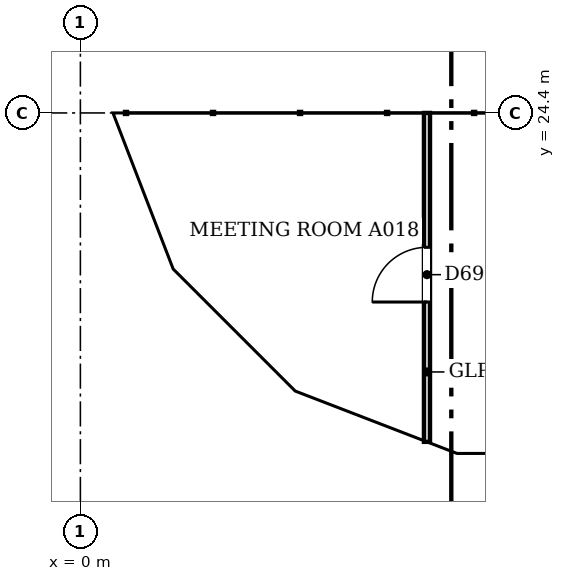
"""IFC4 building model, lengths in metres.
Left out: names, types, materials, properties, quantities, classifications, styles, units other than length and angle.
Written with IfcOpenShell. Run it as: python <this file> out.ifc"""

import sys

from ifc_helpers import new_model, si_unit, direction, frame, frame_2d, origin, place, context, subcontext, project, spatial, polyline, rectangle, outline, extrude, faceted_brep, source, transform, mapped, element, fill, save


model = new_model("IFC4")
c1 = context("Model", 3, precision=1e-05, world=origin(), true_north=direction((0.0, 1.0)))
c2 = subcontext(c1, "Body", "Model", "MODEL_VIEW")
j1 = project(units=[si_unit("LENGTHUNIT", "METRE"), si_unit("PLANEANGLEUNIT", "RADIAN")], contexts=[c1])
p1 = place(None, origin())
s1 = spatial("IfcSite", under=j1, at=p1, CompositionType="ELEMENT")
p2 = place(p1, origin())
s2 = spatial("IfcBuilding", under=s1, at=p2, CompositionType="ELEMENT")
p3 = place(p2, frame((0.0, 0.0, 60.0)))
s3 = spatial("IfcBuildingStorey", under=s2, at=p3, CompositionType="ELEMENT", Elevation=60.0)
m1 = source(origin(), c2, "Body", "Brep", [
    faceted_brep([(3.003, -0.25, 0.0), (3.05, -0.25, 0.06), (3.05, -0.25, 7.54), (3.003, -0.25, 7.6), (0.0, -0.25, 3.8), (0.0, 0.25, 3.8), (2.957, 0.25, 7.541), (2.957, 0.25, 0.059), (3.003, 0.0, 0.0), (3.003, 0.0, 7.6)], [[[0, 1, 2, 3, 4]], [[5, 6, 7]], [[1, 0, 8]], [[9, 3, 2]], [[6, 5, 4, 3, 9]], [[5, 7, 8, 0, 4]], [[1, 8, 7, 6, 9, 2]]]),
])
p4 = place(p3, frame((0.25, 27.45, -3.8), z_axis=(0.0, 0.0, 1.0), x_axis=(0.0, -1.0, 0.0)))
e1 = element("IfcWall", 1, at=p4, inside=s3, PredefinedType="SOLIDWALL", context=c2, shape_type="MappedRepresentation", body=[
    mapped(m1, transform((0.0, 0.0, 0.0), scale=1.0)),
])
m2 = source(origin(), c2, "Body", "SweptSolid", [
    extrude(outline(polyline([(2.803, 6.944), (0.319, 3.8), (2.803, 0.656), (2.803, 6.944)])), frame((0.0, 0.26, 0.0), z_axis=(0.0, -1.0, 0.0), x_axis=(1.0, 0.0, 0.0)), (0.0, 0.0, 1.0), 0.52),
])
p5 = place(p4, origin())
e2 = element("IfcOpeningElement", 2, at=p5, cuts=e1, PredefinedType="OPENING", context=c2, shape_type="MappedRepresentation", body=[
    mapped(m2, transform((0.0, 0.0, 0.0), scale=1.0)),
])
m3 = source(origin(), c2, "Body", "Brep", [
    faceted_brep([(0.047, -0.25, 0.0), (2.997, -0.25, 3.8), (0.047, -0.25, 7.6), (0.0, -0.25, 7.541), (0.0, -0.25, 0.059), (0.093, 0.25, 7.54), (2.944, 0.25, 3.868), (2.944, 0.25, 3.732), (0.093, 0.25, 0.06), (2.997, 0.0, 3.8), (0.047, 0.0, 0.0), (0.047, 0.0, 7.6)], [[[0, 1, 2, 3, 4]], [[5, 6, 7, 8]], [[8, 7, 9, 1, 0, 10]], [[6, 5, 11, 2, 1, 9]], [[3, 2, 11]], [[10, 0, 4]], [[8, 10, 4, 3, 11, 5]], [[9, 7, 6]]]),
])
p6 = place(p3, frame((0.233, 24.49, -3.8), z_axis=(0.0, 0.0, 1.0), x_axis=(0.359901446078, -0.932990326376, 0.0)))
e3 = element("IfcWall", 3, at=p6, inside=s3, PredefinedType="SOLIDWALL", context=c2, shape_type="MappedRepresentation", body=[
    mapped(m3, transform((0.0, 0.0, 0.0), scale=1.0)),
])
m4 = source(origin(), c2, "Body", "SweptSolid", [
    extrude(outline(polyline([(0.247, 0.665), (2.681, 3.8), (0.247, 6.935), (0.247, 0.665)])), frame((0.0, 0.26, 0.0), z_axis=(0.0, -1.0, 0.0), x_axis=(1.0, 0.0, 0.0)), (0.0, 0.0, 1.0), 0.52),
])
p7 = place(p6, origin())
e4 = element("IfcOpeningElement", 4, at=p7, cuts=e3, PredefinedType="OPENING", context=c2, shape_type="MappedRepresentation", body=[
    mapped(m4, transform((0.0, 0.0, 0.0), scale=1.0)),
])
m5 = source(origin(), c2, "Body", "Brep", [
    faceted_brep([(2.944, -0.25, 0.0), (2.997, -0.25, 0.068), (2.997, -0.25, 7.532), (2.944, -0.25, 7.6), (0.0, -0.25, 3.8), (0.053, 0.25, 3.868), (2.891, 0.25, 7.532), (2.891, 0.25, 0.068), (0.053, 0.25, 3.732), (2.944, 0.0, 0.0), (2.944, 0.0, 7.6), (0.0, 0.0, 3.8)], [[[0, 1, 2, 3, 4]], [[5, 6, 7, 8]], [[1, 0, 9]], [[10, 3, 2]], [[6, 5, 11, 4, 3, 10]], [[8, 7, 9, 0, 4, 11]], [[8, 11, 5]], [[1, 9, 7, 6, 10, 2]]]),
])
p8 = place(p3, frame((1.312, 21.694, -3.8), z_axis=(0.0, 0.0, 1.0), x_axis=(0.707066050402, -0.707147509625, 0.0)))
e5 = element("IfcWall", 5, at=p8, inside=s3, PredefinedType="SOLIDWALL", context=c2, shape_type="MappedRepresentation", body=[
    mapped(m5, transform((0.0, 0.0, 0.0), scale=1.0)),
])
m6 = source(origin(), c2, "Body", "SweptSolid", [
    extrude(outline(polyline([(2.744, 6.934), (0.316, 3.8), (2.744, 0.666), (2.744, 6.934)])), frame((0.0, 0.26, 0.0), z_axis=(0.0, -1.0, 0.0), x_axis=(1.0, 0.0, 0.0)), (0.0, 0.0, 1.0), 0.52),
])
p9 = place(p8, origin())
e6 = element("IfcOpeningElement", 6, at=p9, cuts=e5, PredefinedType="OPENING", context=c2, shape_type="MappedRepresentation", body=[
    mapped(m6, transform((0.0, 0.0, 0.0), scale=1.0)),
])
m7 = source(origin(), c2, "Body", "Brep", [
    faceted_brep([(0.053, -0.25, 0.0), (3.003, -0.25, 3.8), (0.053, -0.25, 7.6), (0.0, -0.25, 7.532), (0.0, -0.25, 0.068), (0.106, 0.25, 7.532), (2.957, 0.25, 3.86), (2.957, 0.25, 3.74), (0.106, 0.25, 0.068), (3.003, 0.0, 3.8), (0.053, 0.0, 0.0), (0.053, 0.0, 7.6)], [[[0, 1, 2, 3, 4]], [[5, 6, 7, 8]], [[8, 7, 9, 1, 0, 10]], [[6, 5, 11, 2, 1, 9]], [[3, 2, 11]], [[10, 0, 4]], [[8, 10, 4, 3, 11, 5]], [[9, 7, 6]]]),
])
p10 = place(p3, frame((3.344, 19.631, -3.8), z_axis=(0.0, 0.0, 1.0), x_axis=(0.933007896601, -0.359855894603, 0.0)))
e7 = element("IfcWall", 7, at=p10, inside=s3, PredefinedType="SOLIDWALL", context=c2, shape_type="MappedRepresentation", body=[
    mapped(m7, transform((0.0, 0.0, 0.0), scale=1.0)),
])
m8 = source(origin(), c2, "Body", "SweptSolid", [
    extrude(outline(polyline([(0.253, 0.665), (2.687, 3.8), (0.253, 6.935), (0.253, 0.665)])), frame((0.0, 0.26, 0.0), z_axis=(0.0, -1.0, 0.0), x_axis=(1.0, 0.0, 0.0)), (0.0, 0.0, 1.0), 0.52),
])
p11 = place(p10, origin())
e8 = element("IfcOpeningElement", 8, at=p11, cuts=e7, PredefinedType="OPENING", context=c2, shape_type="MappedRepresentation", body=[
    mapped(m8, transform((0.0, 0.0, 0.0), scale=1.0)),
])
m9 = source(origin(), c2, "Body", "Brep", [
    faceted_brep([(3.003, -0.25, 0.0), (6.053, -0.25, 3.8), (3.003, -0.25, 7.6), (0.0, -0.25, 3.8), (0.047, 0.25, 3.859), (3.003, 0.25, 7.6), (6.053, 0.25, 3.8), (3.003, 0.25, 0.0), (0.047, 0.25, 3.741), (0.0, 0.0, 3.8)], [[[0, 1, 2, 3]], [[4, 5, 6, 7, 8]], [[7, 6, 1, 0]], [[6, 5, 2, 1]], [[5, 4, 9, 3, 2]], [[8, 7, 0, 3, 9]], [[8, 9, 4]]]),
])
p12 = place(p3, frame((6.146, 18.55, -3.8), z_axis=(0.0, 0.0, 1.0), x_axis=(1.0, 0.0, 0.0)))
e9 = element("IfcWall", 9, at=p12, inside=s3, PredefinedType="SOLIDWALL", context=c2, shape_type="MappedRepresentation", body=[
    mapped(m9, transform((0.0, 0.0, 0.0), scale=1.0)),
])
m10 = source(origin(), c2, "Body", "SweptSolid", [
    extrude(outline(polyline([(3.005, 0.401), (5.733, 3.8), (3.005, 7.199), (0.319, 3.8), (3.005, 0.401)])), frame((0.0, 0.26, 0.0), z_axis=(0.0, -1.0, 0.0), x_axis=(1.0, 0.0, 0.0)), (0.0, 0.0, 1.0), 0.52),
])
p13 = place(p12, origin())
e10 = element("IfcOpeningElement", 10, at=p13, cuts=e9, PredefinedType="OPENING", context=c2, shape_type="MappedRepresentation", body=[
    mapped(m10, transform((0.0, 0.0, 0.0), scale=1.0)),
])
m11 = source(origin(), c2, "Body", "Brep", [
    faceted_brep([(3.05, -0.25, 0.0), (6.053, -0.25, 3.8), (0.0, -0.25, 3.8), (0.0, 0.25, 3.8), (6.007, 0.25, 3.8), (6.007, 0.25, 3.741), (3.05, 0.25, 0.0), (6.053, 0.0, 3.8)], [[[0, 1, 2]], [[3, 4, 5, 6]], [[6, 5, 7, 1, 0]], [[4, 3, 2, 1, 7]], [[3, 6, 0, 2]], [[5, 4, 7]]]),
])
p14 = place(p3, frame((0.25, 30.5, 0.0), z_axis=(0.0, 0.0, 1.0), x_axis=(0.0, -1.0, 0.0)))
e11 = element("IfcWall", 11, at=p14, inside=s3, PredefinedType="SOLIDWALL", context=c2, shape_type="MappedRepresentation", body=[
    mapped(m11, transform((0.0, 0.0, 0.0), scale=1.0)),
])
m12 = source(origin(), c2, "Body", "SweptSolid", [
    extrude(outline(polyline([(3.049, 0.401), (5.537, 3.55), (0.521, 3.55), (3.049, 0.401)])), frame((0.0, 0.26, 0.0), z_axis=(0.0, -1.0, 0.0), x_axis=(1.0, 0.0, 0.0)), (0.0, 0.0, 1.0), 0.52),
])
p15 = place(p14, origin())
e12 = element("IfcOpeningElement", 12, at=p15, cuts=e11, PredefinedType="OPENING", context=c2, shape_type="MappedRepresentation", body=[
    mapped(m12, transform((0.0, 0.0, 0.0), scale=1.0)),
])
m13 = source(origin(), c2, "Body", "Brep", [
    faceted_brep([(2.95, -0.25, 0.0), (3.003, -0.25, 0.068), (3.003, -0.25, 3.8), (0.0, -0.25, 3.8), (0.047, 0.25, 3.8), (2.898, 0.25, 3.8), (2.898, 0.25, 0.068), (0.047, 0.25, 3.74), (2.95, 0.0, 0.0), (0.0, 0.0, 3.8)], [[[0, 1, 2, 3]], [[4, 5, 6, 7]], [[1, 0, 8]], [[5, 4, 9, 3, 2]], [[7, 6, 8, 0, 3, 9]], [[7, 9, 4]], [[1, 8, 6, 5, 2]]]),
])
p16 = place(p3, frame((0.25, 24.447, 0.0), z_axis=(0.0, 0.0, 1.0), x_axis=(0.35992665181, -0.932980602862, 0.0)))
e13 = element("IfcWall", 13, at=p16, inside=s3, PredefinedType="SOLIDWALL", context=c2, shape_type="MappedRepresentation", body=[
    mapped(m13, transform((0.0, 0.0, 0.0), scale=1.0)),
])
m14 = source(origin(), c2, "Body", "SweptSolid", [
    extrude(outline(polyline([(2.75, 3.55), (0.511, 3.55), (2.75, 0.665), (2.75, 3.55)])), frame((0.0, 0.26, 0.0), z_axis=(0.0, -1.0, 0.0), x_axis=(1.0, 0.0, 0.0)), (0.0, 0.0, 1.0), 0.52),
])
p17 = place(p16, origin())
e14 = element("IfcOpeningElement", 14, at=p17, cuts=e13, PredefinedType="OPENING", context=c2, shape_type="MappedRepresentation", body=[
    mapped(m14, transform((0.0, 0.0, 0.0), scale=1.0)),
])
m15 = source(origin(), c2, "Body", "Brep", [
    faceted_brep([(0.053, -0.25, 0.0), (2.997, -0.25, 3.8), (0.0, -0.25, 3.8), (0.0, -0.25, 0.068), (0.106, 0.25, 3.8), (2.944, 0.25, 3.8), (2.944, 0.25, 3.732), (0.106, 0.25, 0.068), (2.997, 0.0, 3.8), (0.053, 0.0, 0.0)], [[[0, 1, 2, 3]], [[4, 5, 6, 7]], [[7, 6, 8, 1, 0, 9]], [[5, 4, 2, 1, 8]], [[9, 0, 3]], [[7, 9, 3, 2, 4]], [[6, 5, 8]]]),
])
p18 = place(p3, frame((1.274, 21.731, 0.0), z_axis=(0.0, 0.0, 1.0), x_axis=(0.707147509625, -0.707066050402, 0.0)))
e15 = element("IfcWall", 15, at=p18, inside=s3, PredefinedType="SOLIDWALL", context=c2, shape_type="MappedRepresentation", body=[
    mapped(m15, transform((0.0, 0.0, 0.0), scale=1.0)),
])
m16 = source(origin(), c2, "Body", "SweptSolid", [
    extrude(outline(polyline([(0.253, 0.666), (2.487, 3.55), (0.253, 3.55), (0.253, 0.666)])), frame((0.0, 0.26, 0.0), z_axis=(0.0, -1.0, 0.0), x_axis=(1.0, 0.0, 0.0)), (0.0, 0.0, 1.0), 0.52),
])
p19 = place(p18, origin())
e16 = element("IfcOpeningElement", 16, at=p19, cuts=e15, PredefinedType="OPENING", context=c2, shape_type="MappedRepresentation", body=[
    mapped(m16, transform((0.0, 0.0, 0.0), scale=1.0)),
])
m17 = source(origin(), c2, "Body", "Brep", [
    faceted_brep([(2.95, -0.25, 0.0), (2.997, -0.25, 0.059), (2.997, -0.25, 3.8), (0.0, -0.25, 3.8), (0.053, 0.25, 3.8), (2.904, 0.25, 3.8), (2.904, 0.25, 0.06), (0.053, 0.25, 3.732), (2.95, 0.0, 0.0), (0.0, 0.0, 3.8)], [[[0, 1, 2, 3]], [[4, 5, 6, 7]], [[1, 0, 8]], [[5, 4, 9, 3, 2]], [[7, 6, 8, 0, 3, 9]], [[7, 9, 4]], [[1, 8, 6, 5, 2]]]),
])
p20 = place(p3, frame((3.394, 19.612, 0.0), z_axis=(0.0, 0.0, 1.0), x_axis=(0.932990326376, -0.359901446078, 0.0)))
e17 = element("IfcWall", 17, at=p20, inside=s3, PredefinedType="SOLIDWALL", context=c2, shape_type="MappedRepresentation", body=[
    mapped(m17, transform((0.0, 0.0, 0.0), scale=1.0)),
])
p21 = place(p20, origin())
e18 = element("IfcOpeningElement", 18, at=p21, cuts=e17, PredefinedType="OPENING", context=c2, shape_type="MappedRepresentation", body=[
    mapped(m14, transform((0.0, 0.0, 0.0), scale=1.0)),
])
m18 = source(origin(), c2, "Body", "Brep", [
    faceted_brep([(0.047, -0.25, 0.0), (3.05, -0.25, 3.8), (0.0, -0.25, 3.8), (0.0, -0.25, 0.06), (0.093, 0.25, 3.8), (3.05, 0.25, 3.8), (0.093, 0.25, 0.059), (0.047, 0.0, 0.0)], [[[0, 1, 2, 3]], [[4, 5, 6]], [[6, 5, 1, 0, 7]], [[5, 4, 2, 1]], [[7, 0, 3]], [[6, 7, 3, 2, 4]]]),
])
p22 = place(p3, frame((6.1, 18.55, 0.0), z_axis=(0.0, 0.0, 1.0), x_axis=(1.0, 0.0, 0.0)))
e19 = element("IfcWall", 19, at=p22, inside=s3, PredefinedType="SOLIDWALL", context=c2, shape_type="MappedRepresentation", body=[
    mapped(m18, transform((0.0, 0.0, 0.0), scale=1.0)),
])
m19 = source(origin(), c2, "Body", "SweptSolid", [
    extrude(outline(polyline([(0.247, 0.656), (2.534, 3.55), (0.247, 3.55), (0.247, 0.656)])), frame((0.0, 0.26, 0.0), z_axis=(0.0, -1.0, 0.0), x_axis=(1.0, 0.0, 0.0)), (0.0, 0.0, 1.0), 0.52),
])
p23 = place(p22, origin())
e20 = element("IfcOpeningElement", 20, at=p23, cuts=e19, PredefinedType="OPENING", context=c2, shape_type="MappedRepresentation", body=[
    mapped(m19, transform((0.0, 0.0, 0.0), scale=1.0)),
])
p24 = place(p3, frame((5.7, 18.99, 0.0), z_axis=(0.0, 0.0, 1.0), x_axis=(0.0, 1.0, 0.0)))
e21 = element("IfcWall", 21, at=p24, inside=s3, PredefinedType="PARTITIONING", context=c2, shape_type="SweptSolid", body=[
    extrude(rectangle(XDim=5.41, YDim=0.1, at=frame_2d((2.705, 0.0))), origin(), (0.0, 0.0, 1.0), 2.888),
])
m20 = source(origin(), c2, "Body", "SweptSolid", [
    extrude(rectangle(XDim=0.9, YDim=2.1, at=frame_2d((0.45, 1.05))), frame((0.0, 0.06, 0.0), z_axis=(0.0, -1.0, 0.0), x_axis=(1.0, 0.0, 0.0)), (0.0, 0.0, 1.0), 0.12),
])
p25 = place(p24, frame((2.3, 0.0, 0.0)))
e22 = element("IfcOpeningElement", 22, at=p25, cuts=e21, PredefinedType="OPENING", context=c2, shape_type="MappedRepresentation", body=[
    mapped(m20, transform((0.0, 0.0, 0.0), scale=1.0)),
])
m21 = source(origin(), c2, "Body", "SweptSolid", [
    extrude(rectangle(XDim=0.9, YDim=2.1, at=frame_2d((0.45, 1.05))), frame((0.0, 0.025, 0.0), z_axis=(0.0, -1.0, 0.0), x_axis=(1.0, 0.0, 0.0)), (0.0, 0.0, 1.0), 0.05),
])
p26 = place(p25, origin())
e23 = element("IfcDoor", 23, at=p26, inside=s3, OperationType="SINGLE_SWING_LEFT", PredefinedType="DOOR", context=c2, shape_type="MappedRepresentation", body=[
    mapped(m21, transform((0.0, 0.0, 0.0), scale=1.0)),
])
fill(e22, e23)
save(model, sys.argv[1])
